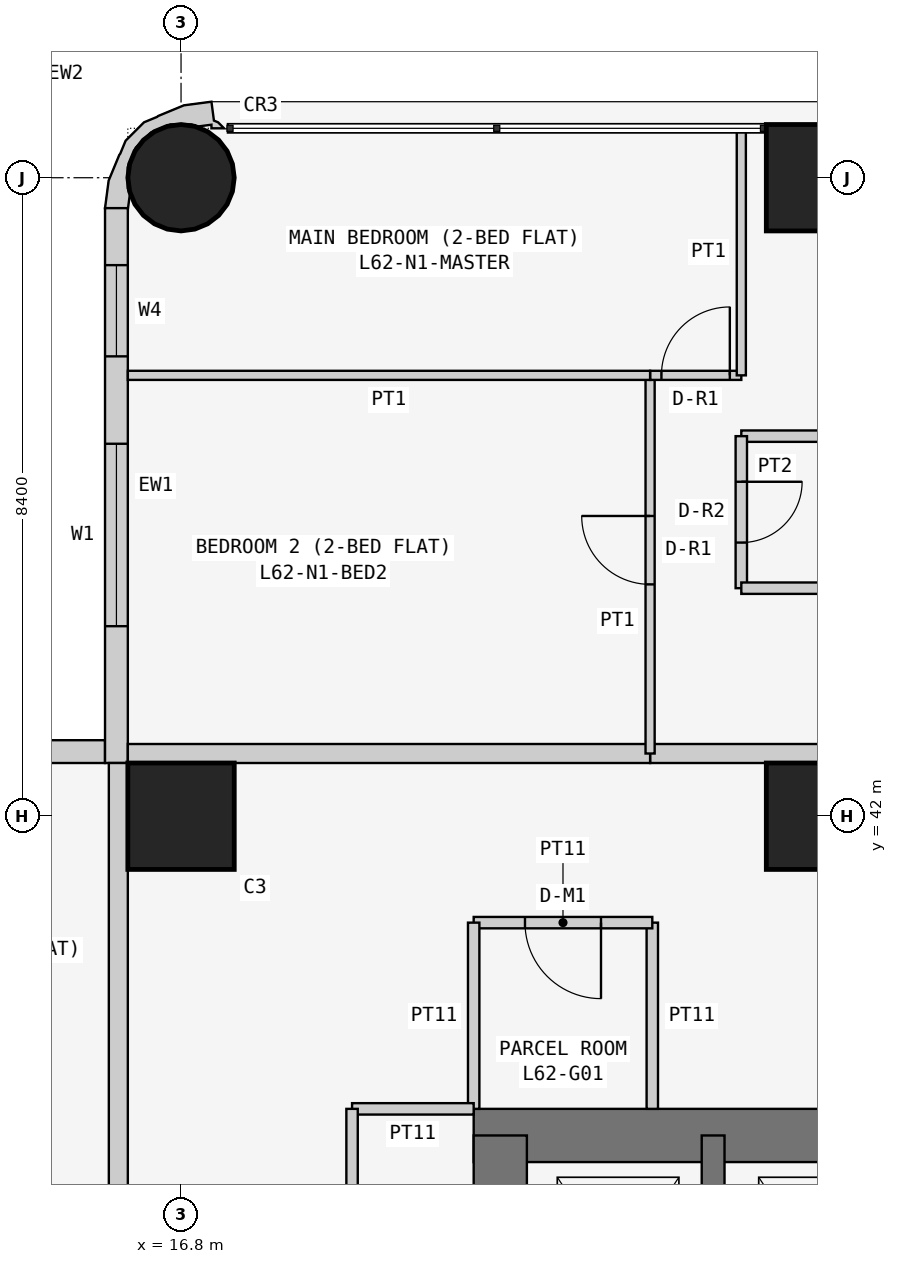
"""IFC4 building model, lengths in metres.
Left out: names, types, materials, properties, quantities, classifications, styles, units other than length and angle.
Written with IfcOpenShell. Run it as: python <this file> out.ifc"""

import sys

from ifc_helpers import new_model, si_unit, direction, frame, frame_2d, origin, origin_2d, place, context, subcontext, project, spatial, polyline, rectangle, circle, outline, extrude, element, fill, save


model = new_model("IFC4")
c1 = context("Model", 3, precision=1e-05, world=origin(), true_north=direction((0.0, 1.0)))
c2 = subcontext(c1, "Body", "Model", "MODEL_VIEW")
j1 = project(units=[si_unit("LENGTHUNIT", "METRE"), si_unit("PLANEANGLEUNIT", "RADIAN")], contexts=[c1])
p1 = place(None, origin())
s1 = spatial("IfcSite", under=j1, at=p1, CompositionType="ELEMENT")
p2 = place(p1, origin())
s2 = spatial("IfcBuilding", under=s1, at=p2, CompositionType="ELEMENT")
p3 = place(p2, frame((0.0, 0.0, 237.3)))
s3 = spatial("IfcBuildingStorey", under=s2, at=p3, CompositionType="ELEMENT", Elevation=237.3)
p4 = place(p3, frame((16.8, 42.0, 0.0), z_axis=(0.0, 0.0, 1.0), x_axis=(1.0, 0.0, 0.0)))
e1 = element("IfcColumn", 1, at=p4, inside=s3, PredefinedType="COLUMN", context=c2, shape_type="SweptSolid", body=[
    extrude(rectangle(XDim=1.4, YDim=1.4, at=origin_2d()), origin(), (0.0, 0.0, 1.0), 3.6),
])
p5 = place(p3, frame((16.8, 50.4, 0.0), z_axis=(0.0, 0.0, 1.0), x_axis=(1.0, 0.0, 0.0)))
e2 = element("IfcColumn", 2, at=p5, inside=s3, PredefinedType="COLUMN", context=c2, shape_type="SweptSolid", body=[
    extrude(circle(Radius=0.7, at=origin_2d()), origin(), (0.0, 0.0, 1.0), 3.6),
])
for number, where, z_axis, x_axis in (
    (3, (25.2, 42.0, 0.0), (0.0, 0.0, 1.0), (1.0, 0.0, 0.0)),
    (4, (25.2, 50.4, 0.0), (0.0, 0.0, 1.0), (1.0, 0.0, 0.0)),
):
    element("IfcColumn", number, at=place(p3, frame(where, z_axis=z_axis, x_axis=x_axis)), inside=s3, PredefinedType="COLUMN", context=c2, shape_type="SweptSolid", body=[
        extrude(rectangle(XDim=1.4, YDim=1.4, at=origin_2d()), origin(), (0.0, 0.0, 1.0), 3.6),
    ])
p6 = place(p3, frame((37.8, 37.8, 0.0), z_axis=(0.0, 0.0, 1.0), x_axis=(-1.0, 0.0, 0.0)))
e5 = element("IfcWall", 5, at=p6, inside=s3, PredefinedType="SHEAR", context=c2, shape_type="SweptSolid", body=[
    extrude(rectangle(XDim=17.15, YDim=0.7, at=frame_2d((8.575, 0.0))), origin(), (0.0, 0.0, 1.0), 3.6),
])
p7 = place(p3, frame((21.0, 37.8, 0.0), z_axis=(0.0, 0.0, 1.0), x_axis=(0.0, -1.0, 0.0)))
e6 = element("IfcWall", 6, at=p7, inside=s3, PredefinedType="SHEAR", context=c2, shape_type="SweptSolid", body=[
    extrude(rectangle(XDim=17.15, YDim=0.7, at=frame_2d((8.575, 0.0))), origin(), (0.0, 0.0, 1.0), 3.6),
])
p8 = place(p7, frame((5.4, 0.0, 0.0)))
e7 = element("IfcOpeningElement", 7, at=p8, cuts=e6, PredefinedType="OPENING", context=c2, shape_type="SweptSolid", body=[
    extrude(rectangle(XDim=1.2, YDim=2.1, at=frame_2d((0.6, 1.05))), frame((0.0, 0.36, 0.0), z_axis=(0.0, -1.0, 0.0), x_axis=(1.0, 0.0, 0.0)), (0.0, 0.0, 1.0), 0.72),
])
p9 = place(p3, frame((23.8, 34.6, 0.0), z_axis=(0.0, 0.0, 1.0), x_axis=(0.0, 1.0, 0.0)))
e8 = element("IfcWall", 8, at=p9, inside=s3, PredefinedType="SHEAR", context=c2, shape_type="SweptSolid", body=[
    extrude(rectangle(XDim=3.2, YDim=0.3, at=frame_2d((1.6, 0.0))), origin(), (0.0, 0.0, 1.0), 3.6),
])
p10 = place(p3, frame((15.8, 42.85, 0.0), z_axis=(0.0, 0.0, 1.0), x_axis=(-1.0, 0.0, 0.0)))
e9 = element("IfcWall", 9, at=p10, inside=s3, PredefinedType="SOLIDWALL", context=c2, shape_type="SweptSolid", body=[
    extrude(rectangle(XDim=15.4, YDim=0.3, at=frame_2d((7.7, 0.0))), origin(), (0.0, 0.0, 1.0), 3.45),
])
p11 = place(p10, frame((1.2, 0.0, 0.9)))
e10 = element("IfcOpeningElement", 10, at=p11, cuts=e9, PredefinedType="OPENING", context=c2, shape_type="SweptSolid", body=[
    extrude(rectangle(XDim=1.8, YDim=1.5, at=frame_2d((0.9, 0.75))), frame((0.0, 0.16, 0.0), z_axis=(0.0, -1.0, 0.0), x_axis=(1.0, 0.0, 0.0)), (0.0, 0.0, 1.0), 0.32),
])
p12 = place(p10, frame((4.95, 0.0, 1.5)))
e11 = element("IfcOpeningElement", 11, at=p12, cuts=e9, PredefinedType="OPENING", context=c2, shape_type="SweptSolid", body=[
    extrude(rectangle(XDim=0.9, YDim=0.7, at=frame_2d((0.45, 0.35))), frame((0.0, 0.16, 0.0), z_axis=(0.0, -1.0, 0.0), x_axis=(1.0, 0.0, 0.0)), (0.0, 0.0, 1.0), 0.32),
])
p13 = place(p10, frame((8.5, 0.0, 0.9)))
e12 = element("IfcOpeningElement", 12, at=p13, cuts=e9, PredefinedType="OPENING", context=c2, shape_type="SweptSolid", body=[
    extrude(rectangle(XDim=1.8, YDim=1.5, at=frame_2d((0.9, 0.75))), frame((0.0, 0.16, 0.0), z_axis=(0.0, -1.0, 0.0), x_axis=(1.0, 0.0, 0.0)), (0.0, 0.0, 1.0), 0.32),
])
p14 = place(p10, frame((12.5, 0.0, 0.0)))
e13 = element("IfcOpeningElement", 13, at=p14, cuts=e9, PredefinedType="OPENING", context=c2, shape_type="SweptSolid", body=[
    extrude(rectangle(XDim=0.9, YDim=2.4, at=frame_2d((0.45, 1.2))), frame((0.0, 0.16, 0.0), z_axis=(0.0, -1.0, 0.0), x_axis=(1.0, 0.0, 0.0)), (0.0, 0.0, 1.0), 0.32),
])
p15 = place(p10, frame((13.5, 0.0, 0.9)))
e14 = element("IfcOpeningElement", 14, at=p15, cuts=e9, PredefinedType="OPENING", context=c2, shape_type="SweptSolid", body=[
    extrude(rectangle(XDim=1.2, YDim=1.5, at=frame_2d((0.6, 0.75))), frame((0.0, 0.16, 0.0), z_axis=(0.0, -1.0, 0.0), x_axis=(1.0, 0.0, 0.0)), (0.0, 0.0, 1.0), 0.32),
])
p16 = place(p3, frame((15.95, 50.0, 0.0), z_axis=(0.0, 0.0, 1.0), x_axis=(0.0, -1.0, 0.0)))
e15 = element("IfcWall", 15, at=p16, inside=s3, PredefinedType="SOLIDWALL", context=c2, shape_type="SweptSolid", body=[
    extrude(rectangle(XDim=7.3, YDim=0.3, at=frame_2d((3.65, 0.0))), origin(), (0.0, 0.0, 1.0), 3.45),
])
p17 = place(p16, frame((3.1, 0.0, 0.9)))
e16 = element("IfcOpeningElement", 16, at=p17, cuts=e15, PredefinedType="OPENING", context=c2, shape_type="SweptSolid", body=[
    extrude(rectangle(XDim=2.4, YDim=1.5, at=frame_2d((1.2, 0.75))), frame((0.0, 0.16, 0.0), z_axis=(0.0, -1.0, 0.0), x_axis=(1.0, 0.0, 0.0)), (0.0, 0.0, 1.0), 0.32),
])
p18 = place(p16, frame((0.75, 0.0, 0.9)))
e17 = element("IfcOpeningElement", 17, at=p18, cuts=e15, PredefinedType="OPENING", context=c2, shape_type="SweptSolid", body=[
    extrude(rectangle(XDim=1.2, YDim=1.5, at=frame_2d((0.6, 0.75))), frame((0.0, 0.16, 0.0), z_axis=(0.0, -1.0, 0.0), x_axis=(1.0, 0.0, 0.0)), (0.0, 0.0, 1.0), 0.32),
])
p19 = place(p3, frame((17.312, 50.988, 0.0), z_axis=(0.0, 0.0, 1.0), x_axis=(-0.439933741929, 0.898030234854, 0.0)))
e18 = element("IfcWall", 18, at=p19, inside=s3, PredefinedType="SOLIDWALL", context=c2, shape_type="SweptSolid", body=[
    extrude(outline(polyline([(0.138, -0.039), (0.182, -0.0), (0.419, -0.08), (0.536, 0.266), (0.559, 0.631), (0.555, 0.651), (0.566, 0.836), (0.456, 1.159), (0.333, 1.298), (0.324, 1.316), (0.082, 1.591), (-0.222, 1.793), (-0.39, 1.541), (-0.372, 1.532), (-0.195, 1.414), (-0.12, 1.41), (0.131, 1.287), (0.315, 1.078), (0.406, 0.814), (0.388, 0.536), (0.265, 0.285), (0.209, 0.236), (0.148, 0.053), (0.105, 0.074), (0.032, -0.076), (0.138, -0.039)])), origin(), (0.0, 0.0, 1.0), 3.45),
])
p20 = place(p3, frame((23.0, 38.15, 0.0), z_axis=(0.0, 0.0, 1.0), x_axis=(0.0, 1.0, 0.0)))
e19 = element("IfcWall", 19, at=p20, inside=s3, PredefinedType="PARTITIONING", context=c2, shape_type="SweptSolid", body=[
    extrude(rectangle(XDim=2.45, YDim=0.15, at=frame_2d((1.225, 0.0))), origin(), (0.0, 0.0, 1.0), 3.45),
])
p21 = place(p3, frame((23.0, 40.6, 0.0), z_axis=(0.0, 0.0, 1.0), x_axis=(-1.0, 0.0, 0.0)))
e20 = element("IfcWall", 20, at=p21, inside=s3, PredefinedType="PARTITIONING", context=c2, shape_type="SweptSolid", body=[
    extrude(rectangle(XDim=2.35, YDim=0.15, at=frame_2d((1.175, 0.0))), origin(), (0.0, 0.0, 1.0), 3.45),
])
p22 = place(p21, frame((0.675, 0.0, 0.0)))
e21 = element("IfcOpeningElement", 21, at=p22, cuts=e20, PredefinedType="OPENING", context=c2, shape_type="SweptSolid", body=[
    extrude(rectangle(XDim=1.0, YDim=2.1, at=frame_2d((0.5, 1.05))), frame((0.0, 0.085, 0.0), z_axis=(0.0, -1.0, 0.0), x_axis=(1.0, 0.0, 0.0)), (0.0, 0.0, 1.0), 0.17),
])
p23 = place(p3, frame((20.65, 40.6, 0.0), z_axis=(0.0, 0.0, 1.0), x_axis=(0.0, -1.0, 0.0)))
e22 = element("IfcWall", 22, at=p23, inside=s3, PredefinedType="PARTITIONING", context=c2, shape_type="SweptSolid", body=[
    extrude(rectangle(XDim=2.45, YDim=0.15, at=frame_2d((1.225, 0.0))), origin(), (0.0, 0.0, 1.0), 3.45),
])
p24 = place(p3, frame((20.65, 38.15, 0.0), z_axis=(0.0, 0.0, 1.0), x_axis=(-1.0, 0.0, 0.0)))
e23 = element("IfcWall", 23, at=p24, inside=s3, PredefinedType="PARTITIONING", context=c2, shape_type="SweptSolid", body=[
    extrude(rectangle(XDim=1.6, YDim=0.15, at=frame_2d((0.8, 0.0))), origin(), (0.0, 0.0, 1.0), 3.45),
])
p25 = place(p3, frame((19.05, 38.15, 0.0), z_axis=(0.0, 0.0, 1.0), x_axis=(0.0, -1.0, 0.0)))
e24 = element("IfcWall", 24, at=p25, inside=s3, PredefinedType="PARTITIONING", context=c2, shape_type="SweptSolid", body=[
    extrude(rectangle(XDim=3.55, YDim=0.15, at=frame_2d((1.775, 0.0))), origin(), (0.0, 0.0, 1.0), 3.45),
])
p26 = place(p25, frame((1.275, 0.0, 0.0)))
e25 = element("IfcOpeningElement", 25, at=p26, cuts=e24, PredefinedType="OPENING", context=c2, shape_type="SweptSolid", body=[
    extrude(rectangle(XDim=1.0, YDim=2.1, at=frame_2d((0.5, 1.05))), frame((0.0, 0.085, 0.0), z_axis=(0.0, -1.0, 0.0), x_axis=(1.0, 0.0, 0.0)), (0.0, 0.0, 1.0), 0.17),
])
p27 = place(p3, frame((22.971, 42.825, 0.0), z_axis=(0.0, 0.0, 1.0), x_axis=(1.0, 0.0, 0.0)))
e26 = element("IfcWall", 26, at=p27, inside=s3, PredefinedType="PARTITIONING", context=c2, shape_type="SweptSolid", body=[
    extrude(rectangle(XDim=6.429, YDim=0.25, at=frame_2d((3.214, 0.0))), origin(), (0.0, 0.0, 1.0), 3.45),
])
p28 = place(p27, frame((4.929, 0.0, 0.0)))
e27 = element("IfcOpeningElement", 27, at=p28, cuts=e26, PredefinedType="OPENING", context=c2, shape_type="SweptSolid", body=[
    extrude(rectangle(XDim=1.0, YDim=2.1, at=frame_2d((0.5, 1.05))), frame((0.0, 0.135, 0.0), z_axis=(0.0, -1.0, 0.0), x_axis=(1.0, 0.0, 0.0)), (0.0, 0.0, 1.0), 0.27),
])
p29 = place(p3, frame((16.1, 42.825, 0.0), z_axis=(0.0, 0.0, 1.0), x_axis=(1.0, 0.0, 0.0)))
e28 = element("IfcWall", 28, at=p29, inside=s3, PredefinedType="PARTITIONING", context=c2, shape_type="SweptSolid", body=[
    extrude(rectangle(XDim=6.871, YDim=0.25, at=frame_2d((3.436, 0.0))), origin(), (0.0, 0.0, 1.0), 3.45),
])
p30 = place(p3, frame((15.975, 36.229, 0.0), z_axis=(0.0, 0.0, 1.0), x_axis=(0.0, 1.0, 0.0)))
e29 = element("IfcWall", 29, at=p30, inside=s3, PredefinedType="PARTITIONING", context=c2, shape_type="SweptSolid", body=[
    extrude(rectangle(XDim=6.471, YDim=0.25, at=frame_2d((3.235, 0.0))), origin(), (0.0, 0.0, 1.0), 3.45),
])
p31 = place(p3, frame((29.4, 47.0, 0.0), z_axis=(0.0, 0.0, 1.0), x_axis=(-1.0, 0.0, 0.0)))
e30 = element("IfcWall", 30, at=p31, inside=s3, PredefinedType="PARTITIONING", context=c2, shape_type="SweptSolid", body=[
    extrude(rectangle(XDim=5.229, YDim=0.15, at=frame_2d((2.615, 0.0))), origin(), (0.0, 0.0, 1.0), 3.45),
])
p32 = place(p3, frame((24.171, 47.0, 0.0), z_axis=(0.0, 0.0, 1.0), x_axis=(0.0, -1.0, 0.0)))
e31 = element("IfcWall", 31, at=p32, inside=s3, PredefinedType="PARTITIONING", context=c2, shape_type="SweptSolid", body=[
    extrude(rectangle(XDim=2.0, YDim=0.15, at=frame_2d((1.0, 0.0))), origin(), (0.0, 0.0, 1.0), 3.45),
])
p33 = place(p32, frame((0.6, 0.0, 0.0)))
e32 = element("IfcOpeningElement", 32, at=p33, cuts=e31, PredefinedType="OPENING", context=c2, shape_type="SweptSolid", body=[
    extrude(rectangle(XDim=0.8, YDim=2.1, at=frame_2d((0.4, 1.05))), frame((0.0, 0.085, 0.0), z_axis=(0.0, -1.0, 0.0), x_axis=(1.0, 0.0, 0.0)), (0.0, 0.0, 1.0), 0.17),
])
p34 = place(p3, frame((24.171, 45.0, 0.0), z_axis=(0.0, 0.0, 1.0), x_axis=(1.0, 0.0, 0.0)))
e33 = element("IfcWall", 33, at=p34, inside=s3, PredefinedType="PARTITIONING", context=c2, shape_type="SweptSolid", body=[
    extrude(rectangle(XDim=5.229, YDim=0.15, at=frame_2d((2.615, 0.0))), origin(), (0.0, 0.0, 1.0), 3.45),
])
p35 = place(p3, frame((22.971, 42.825, 0.0), z_axis=(0.0, 0.0, 1.0), x_axis=(0.0, 1.0, 0.0)))
e34 = element("IfcWall", 34, at=p35, inside=s3, PredefinedType="PARTITIONING", context=c2, shape_type="SweptSolid", body=[
    extrude(rectangle(XDim=4.975, YDim=0.12, at=frame_2d((2.488, 0.0))), origin(), (0.0, 0.0, 1.0), 3.45),
])
p36 = place(p35, frame((2.225, 0.0, 0.0)))
e35 = element("IfcOpeningElement", 35, at=p36, cuts=e34, PredefinedType="OPENING", context=c2, shape_type="SweptSolid", body=[
    extrude(rectangle(XDim=0.9, YDim=2.1, at=frame_2d((0.45, 1.05))), frame((0.0, 0.07, 0.0), z_axis=(0.0, -1.0, 0.0), x_axis=(1.0, 0.0, 0.0)), (0.0, 0.0, 1.0), 0.14),
])
p37 = place(p3, frame((22.971, 47.8, 0.0), z_axis=(0.0, 0.0, 1.0), x_axis=(1.0, 0.0, 0.0)))
e36 = element("IfcWall", 36, at=p37, inside=s3, PredefinedType="PARTITIONING", context=c2, shape_type="SweptSolid", body=[
    extrude(rectangle(XDim=1.2, YDim=0.12, at=frame_2d((0.6, 0.0))), origin(), (0.0, 0.0, 1.0), 3.45),
])
p38 = place(p37, frame((0.149, 0.0, 0.0)))
e37 = element("IfcOpeningElement", 37, at=p38, cuts=e36, PredefinedType="OPENING", context=c2, shape_type="SweptSolid", body=[
    extrude(rectangle(XDim=0.9, YDim=2.1, at=frame_2d((0.45, 1.05))), frame((0.0, 0.07, 0.0), z_axis=(0.0, -1.0, 0.0), x_axis=(1.0, 0.0, 0.0)), (0.0, 0.0, 1.0), 0.14),
])
p39 = place(p3, frame((24.171, 47.8, 0.0), z_axis=(0.0, 0.0, 1.0), x_axis=(0.0, 1.0, 0.0)))
e38 = element("IfcWall", 38, at=p39, inside=s3, PredefinedType="PARTITIONING", context=c2, shape_type="SweptSolid", body=[
    extrude(rectangle(XDim=3.25, YDim=0.12, at=frame_2d((1.625, 0.0))), origin(), (0.0, 0.0, 1.0), 3.45),
])
p40 = place(p3, frame((22.971, 47.8, 0.0), z_axis=(0.0, 0.0, 1.0), x_axis=(-1.0, 0.0, 0.0)))
e39 = element("IfcWall", 39, at=p40, inside=s3, PredefinedType="PARTITIONING", context=c2, shape_type="SweptSolid", body=[
    extrude(rectangle(XDim=6.871, YDim=0.12, at=frame_2d((3.436, 0.0))), origin(), (0.0, 0.0, 1.0), 3.45),
])
p41 = place(p17, origin())
e40 = element("IfcWindow", 40, at=p41, inside=s3, PartitioningType="SINGLE_PANEL", PredefinedType="WINDOW", context=c2, shape_type="SweptSolid", body=[
    extrude(rectangle(XDim=2.4, YDim=1.5, at=frame_2d((1.2, 0.75))), frame((0.0, 0.03, 0.0), z_axis=(0.0, -1.0, 0.0), x_axis=(1.0, 0.0, 0.0)), (0.0, 0.0, 1.0), 0.06),
])
fill(e16, e40)
p42 = place(p18, origin())
e41 = element("IfcWindow", 41, at=p42, inside=s3, PartitioningType="SINGLE_PANEL", PredefinedType="WINDOW", context=c2, shape_type="SweptSolid", body=[
    extrude(rectangle(XDim=1.2, YDim=1.5, at=frame_2d((0.6, 0.75))), frame((0.0, 0.03, 0.0), z_axis=(0.0, -1.0, 0.0), x_axis=(1.0, 0.0, 0.0)), (0.0, 0.0, 1.0), 0.06),
])
fill(e17, e41)
p43 = place(p22, origin())
e42 = element("IfcDoor", 42, at=p43, inside=s3, OperationType="SINGLE_SWING_LEFT", PredefinedType="DOOR", context=c2, shape_type="SweptSolid", body=[
    extrude(rectangle(XDim=1.0, YDim=2.1, at=frame_2d((0.5, 1.05))), frame((0.0, 0.025, 0.0), z_axis=(0.0, -1.0, 0.0), x_axis=(1.0, 0.0, 0.0)), (0.0, 0.0, 1.0), 0.05),
])
fill(e21, e42)
p44 = place(p33, origin())
e43 = element("IfcDoor", 43, at=p44, inside=s3, OperationType="SINGLE_SWING_LEFT", PredefinedType="DOOR", context=c2, shape_type="SweptSolid", body=[
    extrude(rectangle(XDim=0.8, YDim=2.1, at=frame_2d((0.4, 1.05))), frame((0.0, 0.025, 0.0), z_axis=(0.0, -1.0, 0.0), x_axis=(1.0, 0.0, 0.0)), (0.0, 0.0, 1.0), 0.05),
])
fill(e32, e43)
p45 = place(p36, origin())
e44 = element("IfcDoor", 44, at=p45, inside=s3, OperationType="SINGLE_SWING_RIGHT", PredefinedType="DOOR", context=c2, shape_type="SweptSolid", body=[
    extrude(rectangle(XDim=0.9, YDim=2.1, at=frame_2d((0.45, 1.05))), frame((0.0, 0.025, 0.0), z_axis=(0.0, -1.0, 0.0), x_axis=(1.0, 0.0, 0.0)), (0.0, 0.0, 1.0), 0.05),
])
fill(e35, e44)
p46 = place(p38, origin())
e45 = element("IfcDoor", 45, at=p46, inside=s3, OperationType="SINGLE_SWING_RIGHT", PredefinedType="DOOR", context=c2, shape_type="SweptSolid", body=[
    extrude(rectangle(XDim=0.9, YDim=2.1, at=frame_2d((0.45, 1.05))), frame((0.0, 0.025, 0.0), z_axis=(0.0, -1.0, 0.0), x_axis=(1.0, 0.0, 0.0)), (0.0, 0.0, 1.0), 0.05),
])
fill(e37, e45)
save(model, sys.argv[1])
